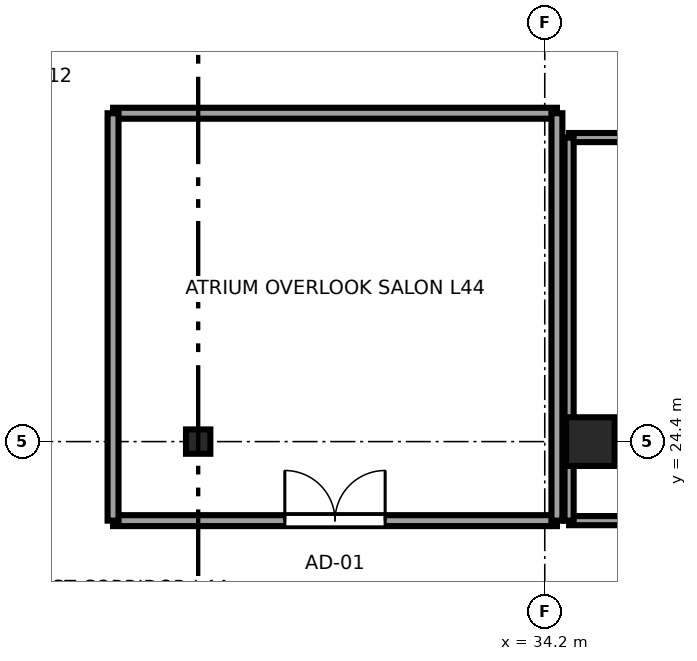
"""IFC4 building model, lengths in metres.
Left out: names, types, materials, properties, quantities, classifications, styles, units other than length and angle.
Written with IfcOpenShell. Run it as: python <this file> out.ifc"""

import sys

from ifc_helpers import new_model, si_unit, direction, frame, frame_2d, origin, origin_2d, place, context, subcontext, project, spatial, rectangle, i_section, extrude, source, transform, mapped, element, fill, save


model = new_model("IFC4")
c1 = context("Model", 3, precision=1e-05, world=origin(), true_north=direction((0.0, 1.0)))
c2 = subcontext(c1, "Body", "Model", "MODEL_VIEW")
j1 = project(units=[si_unit("LENGTHUNIT", "METRE"), si_unit("PLANEANGLEUNIT", "RADIAN")], contexts=[c1])
p1 = place(None, origin())
s1 = spatial("IfcSite", under=j1, at=p1, CompositionType="ELEMENT")
p2 = place(p1, origin())
s2 = spatial("IfcBuilding", under=s1, at=p2, CompositionType="ELEMENT")
p3 = place(p2, frame((0.0, 0.0, 168.35)))
s3 = spatial("IfcBuildingStorey", under=s2, at=p3, CompositionType="ELEMENT", Elevation=168.35)
m1 = source(origin(), c2, "Body", "SweptSolid", [
    extrude(rectangle(XDim=0.8, YDim=0.8, at=origin_2d()), origin(), (0.0, 0.0, 1.0), 3.55),
])
p4 = place(p3, frame((34.95, 24.4, 0.0), z_axis=(0.0, 0.0, 1.0), x_axis=(1.0, 0.0, 0.0)))
e1 = element("IfcColumn", 1, at=p4, inside=s3, PredefinedType="COLUMN", context=c2, shape_type="MappedRepresentation", body=[
    mapped(m1, transform((0.0, 0.0, 0.0), x_axis=(1.0, 0.0, 0.0), y_axis=(0.0, 1.0, 0.0), z_axis=(0.0, 0.0, 1.0), scale=1.0)),
])
m2 = source(origin(), c2, "Body", "SweptSolid", [
    extrude(i_section(OverallWidth=0.4, OverallDepth=0.4, WebThickness=0.02, FlangeThickness=0.035, at=origin_2d()), origin(), (0.0, 0.0, 1.0), 3.55),
])
p5 = place(p3, frame((28.5, 24.4, 0.0), z_axis=(0.0, 0.0, 1.0), x_axis=(1.0, 0.0, 0.0)))
e2 = element("IfcColumn", 2, at=p5, inside=s3, PredefinedType="COLUMN", context=c2, shape_type="MappedRepresentation", body=[
    mapped(m2, transform((0.0, 0.0, 0.0), x_axis=(1.0, 0.0, 0.0), y_axis=(0.0, 1.0, 0.0), z_axis=(0.0, 0.0, 1.0), scale=1.0)),
])
p6 = place(p3, frame((27.1, 23.1, 0.0), z_axis=(0.0, 0.0, 1.0), x_axis=(1.0, 0.0, 0.0)))
e3 = element("IfcWall", 3, at=p6, inside=s3, PredefinedType="PARTITIONING", context=c2, shape_type="SweptSolid", body=[
    extrude(rectangle(XDim=7.3, YDim=0.18, at=frame_2d((3.65, 0.0))), origin(), (0.0, 0.0, 1.0), 3.37),
])
p7 = place(p6, frame((2.825, 0.0, 0.0)))
e4 = element("IfcOpeningElement", 4, at=p7, cuts=e3, PredefinedType="OPENING", context=c2, shape_type="SweptSolid", body=[
    extrude(rectangle(XDim=1.65, YDim=2.15, at=frame_2d((0.825, 1.075))), frame((0.0, 0.1, 0.0), z_axis=(0.0, -1.0, 0.0), x_axis=(1.0, 0.0, 0.0)), (0.0, 0.0, 1.0), 0.2),
])
p8 = place(p3, frame((27.1, 29.8, 0.0), z_axis=(0.0, 0.0, 1.0), x_axis=(1.0, 0.0, 0.0)))
e5 = element("IfcWall", 5, at=p8, inside=s3, PredefinedType="PARTITIONING", context=c2, shape_type="SweptSolid", body=[
    extrude(rectangle(XDim=7.3, YDim=0.18, at=frame_2d((3.65, 0.0))), origin(), (0.0, 0.0, 1.0), 3.37),
])
for number, where, z_axis, x_axis in (
    (6, (27.1, 23.1, 0.0), (0.0, 0.0, 1.0), (0.0, 1.0, 0.0)),
    (7, (34.4, 23.1, 0.0), (0.0, 0.0, 1.0), (0.0, 1.0, 0.0)),
):
    element("IfcWall", number, at=place(p3, frame(where, z_axis=z_axis, x_axis=x_axis)), inside=s3, PredefinedType="PARTITIONING", context=c2, shape_type="SweptSolid", body=[
        extrude(rectangle(XDim=6.7, YDim=0.18, at=frame_2d((3.35, 0.0))), origin(), (0.0, 0.0, 1.0), 3.37),
    ])
p9 = place(p3, frame((34.6, 23.1, 0.0), z_axis=(0.0, 0.0, 1.0), x_axis=(1.0, 0.0, 0.0)))
e8 = element("IfcWall", 8, at=p9, inside=s3, PredefinedType="PARTITIONING", context=c2, shape_type="SweptSolid", body=[
    extrude(rectangle(XDim=7.5, YDim=0.15, at=frame_2d((3.75, 0.0))), origin(), (0.0, 0.0, 1.0), 3.37),
])
p10 = place(p9, frame((2.925, 0.0, 0.0)))
e9 = element("IfcOpeningElement", 9, at=p10, cuts=e8, PredefinedType="OPENING", context=c2, shape_type="SweptSolid", body=[
    extrude(rectangle(XDim=1.65, YDim=2.15, at=frame_2d((0.825, 1.075))), frame((0.0, 0.085, 0.0), z_axis=(0.0, -1.0, 0.0), x_axis=(1.0, 0.0, 0.0)), (0.0, 0.0, 1.0), 0.17),
])
p11 = place(p3, frame((34.6, 29.4, 0.0), z_axis=(0.0, 0.0, 1.0), x_axis=(1.0, 0.0, 0.0)))
e10 = element("IfcWall", 10, at=p11, inside=s3, PredefinedType="PARTITIONING", context=c2, shape_type="SweptSolid", body=[
    extrude(rectangle(XDim=7.5, YDim=0.15, at=frame_2d((3.75, 0.0))), origin(), (0.0, 0.0, 1.0), 3.37),
])
p12 = place(p3, frame((34.6, 23.1, 0.0), z_axis=(0.0, 0.0, 1.0), x_axis=(0.0, 1.0, 0.0)))
e11 = element("IfcWall", 11, at=p12, inside=s3, PredefinedType="PARTITIONING", context=c2, shape_type="SweptSolid", body=[
    extrude(rectangle(XDim=6.3, YDim=0.15, at=frame_2d((3.15, 0.0))), origin(), (0.0, 0.0, 1.0), 3.37),
])
m3 = source(origin(), c2, "Body", "SweptSolid", [
    extrude(rectangle(XDim=1.65, YDim=2.15, at=frame_2d((0.825, 1.075))), frame((0.0, 0.025, 0.0), z_axis=(0.0, -1.0, 0.0), x_axis=(1.0, 0.0, 0.0)), (0.0, 0.0, 1.0), 0.05),
])
p13 = place(p7, origin())
e12 = element("IfcDoor", 12, at=p13, inside=s3, OperationType="DOUBLE_DOOR_SINGLE_SWING", PredefinedType="DOOR", context=c2, shape_type="MappedRepresentation", body=[
    mapped(m3, transform((0.0, 0.0, 0.0), x_axis=(1.0, 0.0, 0.0), y_axis=(0.0, 1.0, 0.0), z_axis=(0.0, 0.0, 1.0), scale=1.0)),
])
fill(e4, e12)
save(model, sys.argv[1])
